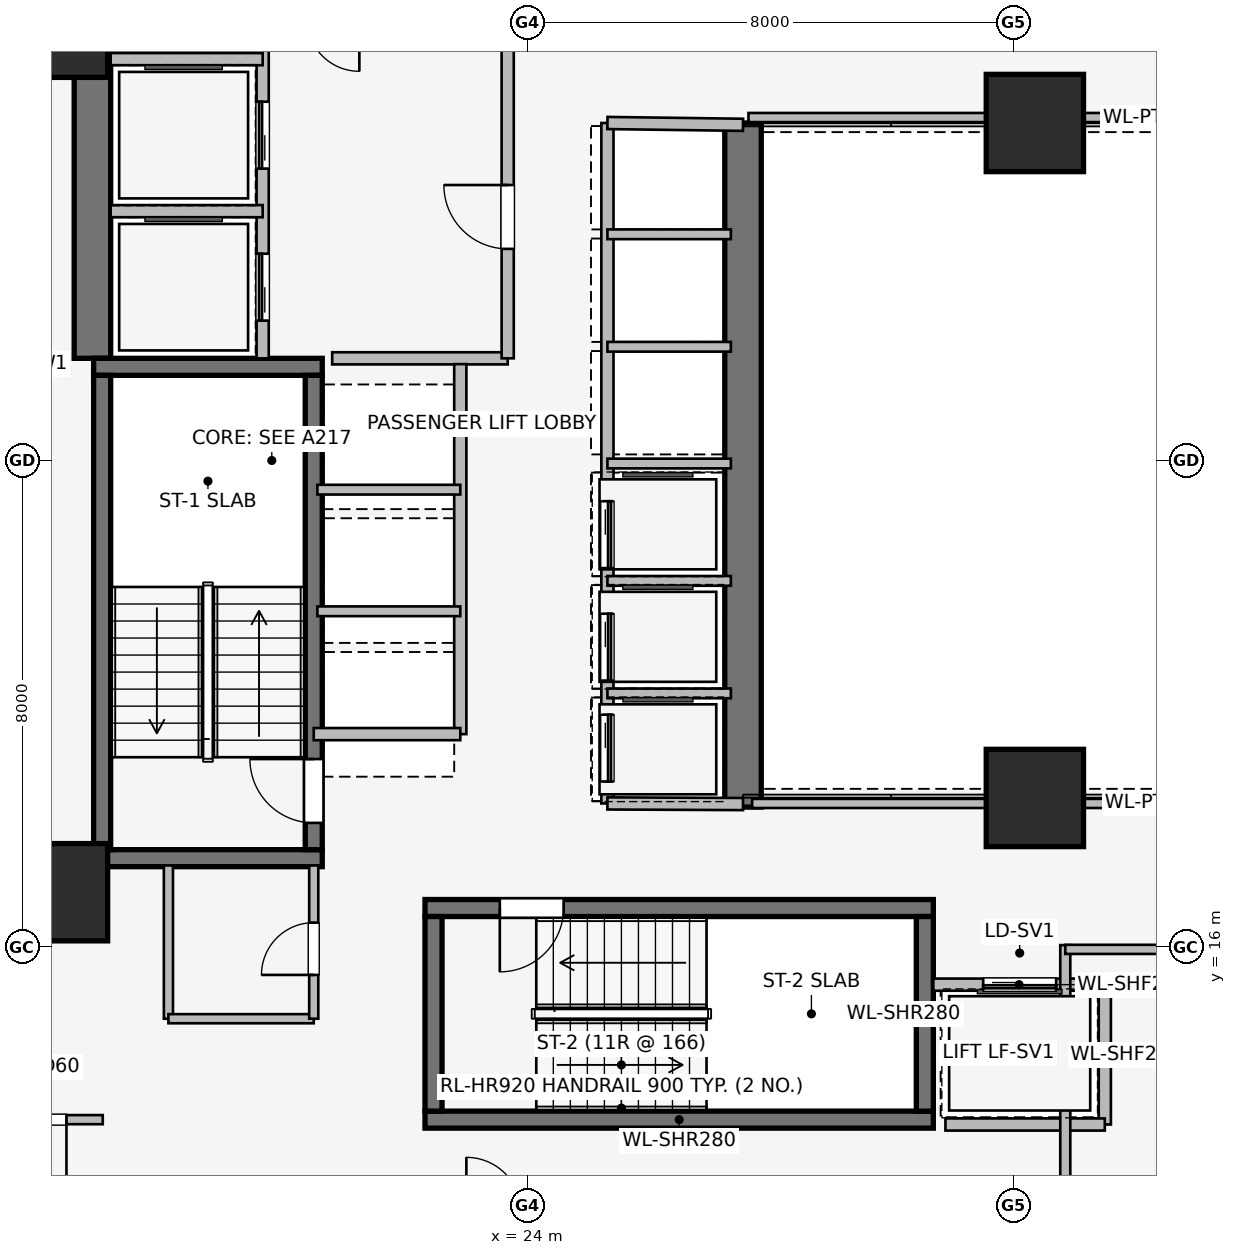
"""IFC4 building model, lengths in metres.
Left out: names, types, materials, properties, quantities, classifications, styles, units other than length and angle.
Written with IfcOpenShell. Run it as: python <this file> out.ifc"""

import sys

from ifc_helpers import new_model, si_unit, direction, frame, frame_2d, origin, origin_2d, place, context, subcontext, project, spatial, rectangle, extrude, element, fill, save


model = new_model("IFC4")
c1 = context("Model", 3, precision=1e-05, world=origin(), true_north=direction((0.0, 1.0)))
c2 = subcontext(c1, "Body", "Model", "MODEL_VIEW")
j1 = project(units=[si_unit("LENGTHUNIT", "METRE"), si_unit("PLANEANGLEUNIT", "RADIAN")], contexts=[c1])
p1 = place(None, origin())
s1 = spatial("IfcSite", under=j1, at=p1, CompositionType="ELEMENT")
p2 = place(p1, origin())
s2 = spatial("IfcBuilding", under=s1, at=p2, CompositionType="ELEMENT")
p3 = place(p2, frame((0.0, 0.0, 59.85)))
s3 = spatial("IfcBuildingStorey", under=s2, at=p3, CompositionType="ELEMENT", Elevation=59.85)
p4 = place(p3, frame((16.85, 25.68, 0.0), z_axis=(0.0, 0.0, 1.0), x_axis=(0.0, 1.0, 0.0)))
e1 = element("IfcWall", 1, at=p4, inside=s3, PredefinedType="SHEAR", context=c2, shape_type="SweptSolid", body=[
    extrude(rectangle(XDim=5.62, YDim=0.6, at=frame_2d((2.81, 0.0))), origin(), (0.0, 0.0, 1.0), 3.65),
])
p5 = place(p3, frame((27.55, 29.55, 0.0), z_axis=(0.0, 0.0, 1.0), x_axis=(0.0, -1.0, 0.0)))
e2 = element("IfcWall", 2, at=p5, inside=s3, PredefinedType="SHEAR", context=c2, shape_type="SweptSolid", body=[
    extrude(rectangle(XDim=11.25, YDim=0.6, at=frame_2d((5.625, 0.0))), origin(), (0.0, 0.0, 1.0), 3.65),
])
for number, where, z_axis, x_axis in (
    (3, (16.87, 17.46, 0.0), (0.0, 0.0, 1.0), (1.0, 0.0, 0.0)),
    (4, (20.63, 25.54, 0.0), (0.0, 0.0, 1.0), (-1.0, 0.0, 0.0)),
):
    element("IfcWall", number, at=place(p3, frame(where, z_axis=z_axis, x_axis=x_axis)), inside=s3, PredefinedType="SHEAR", context=c2, shape_type="SweptSolid", body=[
        extrude(rectangle(XDim=3.76, YDim=0.28, at=frame_2d((1.88, 0.0))), origin(), (0.0, 0.0, 1.0), 3.65),
    ])
p6 = place(p3, frame((17.01, 25.4, 0.0), z_axis=(0.0, 0.0, 1.0), x_axis=(0.0, -1.0, 0.0)))
e5 = element("IfcWall", 5, at=p6, inside=s3, PredefinedType="SHEAR", context=c2, shape_type="SweptSolid", body=[
    extrude(rectangle(XDim=7.8, YDim=0.28, at=frame_2d((3.9, 0.0))), origin(), (0.0, 0.0, 1.0), 3.65),
])
p7 = place(p3, frame((20.49, 17.6, 0.0), z_axis=(0.0, 0.0, 1.0), x_axis=(0.0, 1.0, 0.0)))
e6 = element("IfcWall", 6, at=p7, inside=s3, PredefinedType="SHEAR", context=c2, shape_type="SweptSolid", body=[
    extrude(rectangle(XDim=7.8, YDim=0.28, at=frame_2d((3.9, 0.0))), origin(), (0.0, 0.0, 1.0), 3.65),
])
p8 = place(p7, frame((0.44, 0.0, 0.0)))
e7 = element("IfcOpeningElement", 7, at=p8, cuts=e6, PredefinedType="OPENING", context=c2, shape_type="SweptSolid", body=[
    extrude(rectangle(XDim=1.05, YDim=2.0, at=frame_2d((0.525, 1.0))), frame((0.0, 0.15, 0.0), z_axis=(0.0, -1.0, 0.0), x_axis=(1.0, 0.0, 0.0)), (0.0, 0.0, 1.0), 0.3),
])
p9 = place(p3, frame((22.32, 13.16, 0.0), z_axis=(0.0, 0.0, 1.0), x_axis=(1.0, 0.0, 0.0)))
e8 = element("IfcWall", 8, at=p9, inside=s3, PredefinedType="SHEAR", context=c2, shape_type="SweptSolid", body=[
    extrude(rectangle(XDim=8.36, YDim=0.28, at=frame_2d((4.18, 0.0))), origin(), (0.0, 0.0, 1.0), 3.65),
])
p10 = place(p3, frame((30.68, 16.64, 0.0), z_axis=(0.0, 0.0, 1.0), x_axis=(-1.0, 0.0, 0.0)))
e9 = element("IfcWall", 9, at=p10, inside=s3, PredefinedType="SHEAR", context=c2, shape_type="SweptSolid", body=[
    extrude(rectangle(XDim=8.36, YDim=0.28, at=frame_2d((4.18, 0.0))), origin(), (0.0, 0.0, 1.0), 3.65),
])
p11 = place(p10, frame((6.08, 0.0, 0.0)))
e10 = element("IfcOpeningElement", 10, at=p11, cuts=e9, PredefinedType="OPENING", context=c2, shape_type="SweptSolid", body=[
    extrude(rectangle(XDim=1.05, YDim=2.0, at=frame_2d((0.525, 1.0))), frame((0.0, 0.15, 0.0), z_axis=(0.0, -1.0, 0.0), x_axis=(1.0, 0.0, 0.0)), (0.0, 0.0, 1.0), 0.3),
])
for number, where, z_axis, x_axis in (
    (11, (22.46, 16.5, 0.0), (0.0, 0.0, 1.0), (0.0, -1.0, 0.0)),
    (12, (30.54, 13.3, 0.0), (0.0, 0.0, 1.0), (0.0, 1.0, 0.0)),
):
    element("IfcWall", number, at=place(p3, frame(where, z_axis=z_axis, x_axis=x_axis)), inside=s3, PredefinedType="SHEAR", context=c2, shape_type="SweptSolid", body=[
        extrude(rectangle(XDim=3.2, YDim=0.28, at=frame_2d((1.6, 0.0))), origin(), (0.0, 0.0, 1.0), 3.65),
    ])
for number, where, z_axis, x_axis in (
    (13, (16.3, 16.9, 0.0), (0.0, 0.0, 1.0), (1.0, 0.0, 0.0)),
    (14, (16.3, 31.1, 0.0), (0.0, 0.0, 1.0), (1.0, 0.0, 0.0)),
    (15, (32.35, 18.45, 0.0), (0.0, 0.0, 1.0), (1.0, 0.0, 0.0)),
    (16, (32.35, 29.55, 0.0), (0.0, 0.0, 1.0), (1.0, 0.0, 0.0)),
):
    element("IfcColumn", number, at=place(p3, frame(where, z_axis=z_axis, x_axis=x_axis)), inside=s3, PredefinedType="COLUMN", context=c2, shape_type="SweptSolid", body=[
        extrude(rectangle(XDim=1.6, YDim=1.6, at=origin_2d()), origin(), (0.0, 0.0, 1.0), 3.65),
    ])
p12 = place(p3, frame((16.998, 11.099, 0.0), z_axis=(0.0, 0.0, 1.0), x_axis=(-0.790691856293, 0.61221433207, 0.0)))
e17 = element("IfcWall", 17, at=p12, inside=s3, PredefinedType="STANDARD", context=c2, shape_type="SweptSolid", body=[
    extrude(rectangle(XDim=1.676, YDim=0.33, at=frame_2d((0.838, 0.0))), origin(), (0.0, 0.0, 1.0), 3.39),
])
p13 = place(p3, frame((19.65, 25.68, 0.0), z_axis=(0.0, 0.0, 1.0), x_axis=(0.0, 1.0, 0.0)))
e18 = element("IfcWall", 18, at=p13, inside=s3, PredefinedType="PARTITIONING", context=c2, shape_type="SweptSolid", body=[
    extrude(rectangle(XDim=5.54, YDim=0.2, at=frame_2d((2.77, 0.0))), origin(), (0.0, 0.0, 1.0), 3.39),
])
p14 = place(p13, frame((0.62, 0.0, 0.0)))
e19 = element("IfcOpeningElement", 19, at=p14, cuts=e18, PredefinedType="OPENING", context=c2, shape_type="SweptSolid", body=[
    extrude(rectangle(XDim=1.1, YDim=2.2, at=frame_2d((0.55, 1.1))), frame((0.0, 0.11, 0.0), z_axis=(0.0, -1.0, 0.0), x_axis=(1.0, 0.0, 0.0)), (0.0, 0.0, 1.0), 0.22),
])
p15 = place(p13, frame((3.12, 0.0, 0.0)))
e20 = element("IfcOpeningElement", 20, at=p15, cuts=e18, PredefinedType="OPENING", context=c2, shape_type="SweptSolid", body=[
    extrude(rectangle(XDim=1.1, YDim=2.2, at=frame_2d((0.55, 1.1))), frame((0.0, 0.11, 0.0), z_axis=(0.0, -1.0, 0.0), x_axis=(1.0, 0.0, 0.0)), (0.0, 0.0, 1.0), 0.22),
])
p16 = place(p3, frame((20.793, 25.68, 0.0), z_axis=(0.0, 0.0, 1.0), x_axis=(1.0, 0.0, 0.0)))
e21 = element("IfcWall", 21, at=p16, inside=s3, PredefinedType="PARTITIONING", context=c2, shape_type="SweptSolid", body=[
    extrude(rectangle(XDim=2.887, YDim=0.2, at=frame_2d((1.443, 0.0))), origin(), (0.0, 0.0, 1.0), 3.39),
])
p17 = place(p3, frame((23.68, 25.68, 0.0), z_axis=(0.0, 0.0, 1.0), x_axis=(0.0, 1.0, 0.0)))
e22 = element("IfcWall", 22, at=p17, inside=s3, PredefinedType="PARTITIONING", context=c2, shape_type="SweptSolid", body=[
    extrude(rectangle(XDim=5.54, YDim=0.2, at=frame_2d((2.77, 0.0))), origin(), (0.0, 0.0, 1.0), 3.39),
])
p18 = place(p17, frame((1.8, 0.0, 0.0)))
e23 = element("IfcOpeningElement", 23, at=p18, cuts=e22, PredefinedType="OPENING", context=c2, shape_type="SweptSolid", body=[
    extrude(rectangle(XDim=1.05, YDim=2.0, at=frame_2d((0.525, 1.0))), frame((0.0, 0.11, 0.0), z_axis=(0.0, -1.0, 0.0), x_axis=(1.0, 0.0, 0.0)), (0.0, 0.0, 1.0), 0.22),
])
p19 = place(p3, frame((17.15, 28.1, 0.0), z_axis=(0.0, 0.0, 1.0), x_axis=(1.0, 0.0, 0.0)))
e24 = element("IfcWall", 24, at=p19, inside=s3, PredefinedType="PARTITIONING", context=c2, shape_type="SweptSolid", body=[
    extrude(rectangle(XDim=2.5, YDim=0.2, at=frame_2d((1.25, 0.0))), origin(), (0.0, 0.0, 1.0), 3.39),
])
p20 = place(p3, frame((19.65, 30.6, 0.0), z_axis=(0.0, 0.0, 1.0), x_axis=(-1.0, 0.0, 0.0)))
e25 = element("IfcWall", 25, at=p20, inside=s3, PredefinedType="PARTITIONING", context=c2, shape_type="SweptSolid", body=[
    extrude(rectangle(XDim=2.5, YDim=0.2, at=frame_2d((1.25, 0.0))), origin(), (0.0, 0.0, 1.0), 2.29),
])
p21 = place(p3, frame((33.5, 15.38, 0.0), z_axis=(0.0, 0.0, 1.0), x_axis=(-1.0, 0.0, 0.0)))
e26 = element("IfcWall", 26, at=p21, inside=s3, PredefinedType="PARTITIONING", context=c2, shape_type="SweptSolid", body=[
    extrude(rectangle(XDim=2.82, YDim=0.2, at=frame_2d((1.41, 0.0))), origin(), (0.0, 0.0, 1.0), 3.39),
])
p22 = place(p21, frame((0.8, 0.0, 0.0)))
e27 = element("IfcOpeningElement", 27, at=p22, cuts=e26, PredefinedType="OPENING", context=c2, shape_type="SweptSolid", body=[
    extrude(rectangle(XDim=1.2, YDim=2.2, at=frame_2d((0.6, 1.1))), frame((0.0, 0.11, 0.0), z_axis=(0.0, -1.0, 0.0), x_axis=(1.0, 0.0, 0.0)), (0.0, 0.0, 1.0), 0.22),
])
p23 = place(p3, frame((33.5, 13.08, 0.0), z_axis=(0.0, 0.0, 1.0), x_axis=(0.0, 1.0, 0.0)))
e28 = element("IfcWall", 28, at=p23, inside=s3, PredefinedType="PARTITIONING", context=c2, shape_type="SweptSolid", body=[
    extrude(rectangle(XDim=2.3, YDim=0.2, at=frame_2d((1.15, 0.0))), origin(), (0.0, 0.0, 1.0), 3.39),
])
p24 = place(p3, frame((30.879, 13.08, 0.0), z_axis=(0.0, 0.0, 1.0), x_axis=(1.0, 0.0, 0.0)))
e29 = element("IfcWall", 29, at=p24, inside=s3, PredefinedType="PARTITIONING", context=c2, shape_type="SweptSolid", body=[
    extrude(rectangle(XDim=2.621, YDim=0.2, at=frame_2d((1.311, 0.0))), origin(), (0.0, 0.0, 1.0), 3.39),
])
p25 = place(p3, frame((22.9, 19.5, 0.0), z_axis=(0.0, 0.0, 1.0), x_axis=(0.0, 1.0, 0.0)))
e30 = element("IfcWall", 30, at=p25, inside=s3, PredefinedType="PARTITIONING", context=c2, shape_type="SweptSolid", body=[
    extrude(rectangle(XDim=6.085, YDim=0.2, at=frame_2d((3.042, 0.0))), origin(), (0.0, 0.0, 1.0), 3.39),
])
p26 = place(p3, frame((20.49, 19.5, 0.0), z_axis=(0.0, 0.0, 1.0), x_axis=(1.0, 0.0, 0.0)))
e31 = element("IfcWall", 31, at=p26, inside=s3, PredefinedType="PARTITIONING", context=c2, shape_type="SweptSolid", body=[
    extrude(rectangle(XDim=2.41, YDim=0.2, at=frame_2d((1.205, 0.0))), origin(), (0.0, 0.0, 1.0), 2.29),
])
for number, where, z_axis, x_axis in (
    (32, (20.55, 21.52, 0.0), (0.0, 0.0, 1.0), (1.0, 0.0, 0.0)),
    (33, (20.55, 23.52, 0.0), (0.0, 0.0, 1.0), (1.0, 0.0, 0.0)),
):
    element("IfcWall", number, at=place(p3, frame(where, z_axis=z_axis, x_axis=x_axis)), inside=s3, PredefinedType="PARTITIONING", context=c2, shape_type="SweptSolid", body=[
        extrude(rectangle(XDim=2.35, YDim=0.16, at=frame_2d((1.175, 0.0))), origin(), (0.0, 0.0, 1.0), 3.39),
    ])
p27 = place(p3, frame((25.32, 29.55, 0.0), z_axis=(0.0, 0.0, 1.0), x_axis=(0.0, -1.0, 0.0)))
e34 = element("IfcWall", 34, at=p27, inside=s3, PredefinedType="PARTITIONING", context=c2, shape_type="SweptSolid", body=[
    extrude(rectangle(XDim=11.19, YDim=0.2, at=frame_2d((5.595, 0.0))), origin(), (0.0, 0.0, 1.0), 3.39),
])
p28 = place(p27, frame((6.22, 0.0, 0.0)))
e35 = element("IfcOpeningElement", 35, at=p28, cuts=e34, PredefinedType="OPENING", context=c2, shape_type="SweptSolid", body=[
    extrude(rectangle(XDim=1.1, YDim=2.2, at=frame_2d((0.55, 1.1))), frame((0.0, 0.11, 0.0), z_axis=(0.0, -1.0, 0.0), x_axis=(1.0, 0.0, 0.0)), (0.0, 0.0, 1.0), 0.22),
])
p29 = place(p27, frame((8.07, 0.0, 0.0)))
e36 = element("IfcOpeningElement", 36, at=p29, cuts=e34, PredefinedType="OPENING", context=c2, shape_type="SweptSolid", body=[
    extrude(rectangle(XDim=1.1, YDim=2.2, at=frame_2d((0.55, 1.1))), frame((0.0, 0.11, 0.0), z_axis=(0.0, -1.0, 0.0), x_axis=(1.0, 0.0, 0.0)), (0.0, 0.0, 1.0), 0.22),
])
p30 = place(p27, frame((9.73, 0.0, 0.0)))
e37 = element("IfcOpeningElement", 37, at=p30, cuts=e34, PredefinedType="OPENING", context=c2, shape_type="SweptSolid", body=[
    extrude(rectangle(XDim=1.1, YDim=2.2, at=frame_2d((0.55, 1.1))), frame((0.0, 0.11, 0.0), z_axis=(0.0, -1.0, 0.0), x_axis=(1.0, 0.0, 0.0)), (0.0, 0.0, 1.0), 0.22),
])
p31 = place(p3, frame((25.32, 18.36, 0.0), z_axis=(0.0, 0.0, 1.0), x_axis=(0.999989925833, -0.004488678231, 0.0)))
e38 = element("IfcWall", 38, at=p31, inside=s3, PredefinedType="PARTITIONING", context=c2, shape_type="SweptSolid", body=[
    extrude(rectangle(XDim=2.23, YDim=0.2, at=frame_2d((1.115, 0.0))), origin(), (0.0, 0.0, 1.0), 3.39),
])
p32 = place(p3, frame((27.55, 29.52, 0.0), z_axis=(0.0, 0.0, 1.0), x_axis=(-0.999909343457, 0.013464949556, 0.0)))
e39 = element("IfcWall", 39, at=p32, inside=s3, PredefinedType="PARTITIONING", context=c2, shape_type="SweptSolid", body=[
    extrude(rectangle(XDim=2.23, YDim=0.2, at=frame_2d((1.115, 0.0))), origin(), (0.0, 0.0, 1.0), 2.29),
])
for number, where, z_axis, x_axis in (
    (40, (25.32, 20.17, 0.0), (0.0, 0.0, 1.0), (1.0, 0.0, 0.0)),
    (41, (25.32, 22.02, 0.0), (0.0, 0.0, 1.0), (1.0, 0.0, 0.0)),
    (42, (25.32, 23.95, 0.0), (0.0, 0.0, 1.0), (1.0, 0.0, 0.0)),
    (43, (25.32, 25.87, 0.0), (0.0, 0.0, 1.0), (1.0, 0.0, 0.0)),
    (44, (25.32, 27.72, 0.0), (0.0, 0.0, 1.0), (1.0, 0.0, 0.0)),
):
    element("IfcWall", number, at=place(p3, frame(where, z_axis=z_axis, x_axis=x_axis)), inside=s3, PredefinedType="PARTITIONING", context=c2, shape_type="SweptSolid", body=[
        extrude(rectangle(XDim=2.03, YDim=0.16, at=frame_2d((1.015, 0.0))), origin(), (0.0, 0.0, 1.0), 3.39),
    ])
p33 = place(p3, frame((18.1, 17.34, 0.0), z_axis=(0.0, 0.0, 1.0), x_axis=(0.0, -1.0, 0.0)))
e45 = element("IfcWall", 45, at=p33, inside=s3, PredefinedType="PARTITIONING", context=c2, shape_type="SweptSolid", body=[
    extrude(rectangle(XDim=2.52, YDim=0.15, at=frame_2d((1.26, 0.0))), origin(), (0.0, 0.0, 1.0), 3.39),
])
p34 = place(p3, frame((18.1, 14.82, 0.0), z_axis=(0.0, 0.0, 1.0), x_axis=(1.0, 0.0, 0.0)))
e46 = element("IfcWall", 46, at=p34, inside=s3, PredefinedType="PARTITIONING", context=c2, shape_type="SweptSolid", body=[
    extrude(rectangle(XDim=2.39, YDim=0.15, at=frame_2d((1.195, 0.0))), origin(), (0.0, 0.0, 1.0), 3.39),
])
p35 = place(p3, frame((20.49, 14.82, 0.0), z_axis=(0.0, 0.0, 1.0), x_axis=(0.0, 1.0, 0.0)))
e47 = element("IfcWall", 47, at=p35, inside=s3, PredefinedType="PARTITIONING", context=c2, shape_type="SweptSolid", body=[
    extrude(rectangle(XDim=2.52, YDim=0.15, at=frame_2d((1.26, 0.0))), origin(), (0.0, 0.0, 1.0), 3.39),
])
p36 = place(p35, frame((0.72, 0.0, 0.0)))
e48 = element("IfcOpeningElement", 48, at=p36, cuts=e47, PredefinedType="OPENING", context=c2, shape_type="SweptSolid", body=[
    extrude(rectangle(XDim=0.86, YDim=2.0, at=frame_2d((0.43, 1.0))), frame((0.0, 0.085, 0.0), z_axis=(0.0, -1.0, 0.0), x_axis=(1.0, 0.0, 0.0)), (0.0, 0.0, 1.0), 0.17),
])
p37 = place(p3, frame((27.7, 18.36, 0.0), z_axis=(0.0, 0.0, 1.0), x_axis=(1.0, 0.0, 0.0)))
e49 = element("IfcWall", 49, at=p37, inside=s3, PredefinedType="PARTITIONING", context=c2, shape_type="SweptSolid", body=[
    extrude(rectangle(XDim=12.14, YDim=0.15, at=frame_2d((6.07, 0.0))), origin(), (0.0, 0.0, 1.0), 2.531),
])
p38 = place(p3, frame((39.84, 29.64, 0.0), z_axis=(0.0, 0.0, 1.0), x_axis=(-1.0, 0.0, 0.0)))
e50 = element("IfcWall", 50, at=p38, inside=s3, PredefinedType="PARTITIONING", context=c2, shape_type="SweptSolid", body=[
    extrude(rectangle(XDim=12.2, YDim=0.15, at=frame_2d((6.1, 0.0))), origin(), (0.0, 0.0, 1.0), 2.531),
])
p39 = place(p3, frame((32.85, 3.064, 0.0), z_axis=(0.0, 0.0, 1.0), x_axis=(0.0, 1.0, 0.0)))
e51 = element("IfcWall", 51, at=p39, inside=s3, PredefinedType="PARTITIONING", context=c2, shape_type="SweptSolid", body=[
    extrude(rectangle(XDim=12.966, YDim=0.165, at=frame_2d((6.483, 0.0))), origin(), (0.0, 0.0, 1.0), 3.39),
])
p40 = place(p3, frame((17.02, 13.16, 0.0), z_axis=(0.0, 0.0, 1.0), x_axis=(-1.0, 0.0, 0.0)))
e52 = element("IfcWall", 52, at=p40, inside=s3, PredefinedType="PARTITIONING", context=c2, shape_type="SweptSolid", body=[
    extrude(rectangle(XDim=2.12, YDim=0.15, at=frame_2d((1.06, 0.0))), origin(), (0.0, 0.0, 1.0), 3.39),
])
p41 = place(p40, frame((0.597, 0.0, 0.0)))
e53 = element("IfcOpeningElement", 53, at=p41, cuts=e52, PredefinedType="OPENING", context=c2, shape_type="SweptSolid", body=[
    extrude(rectangle(XDim=0.96, YDim=2.0, at=frame_2d((0.48, 1.0))), frame((0.0, 0.085, 0.0), z_axis=(0.0, -1.0, 0.0), x_axis=(1.0, 0.0, 0.0)), (0.0, 0.0, 1.0), 0.17),
])
p42 = place(p3, frame((32.85, 15.96, 0.0), z_axis=(0.0, 0.0, 1.0), x_axis=(1.0, 0.0, 0.0)))
e54 = element("IfcWall", 54, at=p42, inside=s3, PredefinedType="PARTITIONING", context=c2, shape_type="SweptSolid", body=[
    extrude(rectangle(XDim=27.403, YDim=0.15, at=frame_2d((13.701, 0.0))), origin(), (0.0, 0.0, 1.0), 3.39),
])
p43 = place(p42, frame((13.235, 0.0, 0.0)))
e55 = element("IfcOpeningElement", 55, at=p43, cuts=e54, PredefinedType="OPENING", context=c2, shape_type="SweptSolid", body=[
    extrude(rectangle(XDim=0.96, YDim=2.0, at=frame_2d((0.48, 1.0))), frame((0.0, 0.085, 0.0), z_axis=(0.0, -1.0, 0.0), x_axis=(1.0, 0.0, 0.0)), (0.0, 0.0, 1.0), 0.17),
])
p44 = place(p8, origin())
e56 = element("IfcDoor", 56, at=p44, inside=s3, OperationType="SINGLE_SWING_RIGHT", PredefinedType="DOOR", context=c2, shape_type="SweptSolid", body=[
    extrude(rectangle(XDim=1.05, YDim=2.0, at=frame_2d((0.525, 1.0))), frame((0.0, 0.025, 0.0), z_axis=(0.0, -1.0, 0.0), x_axis=(1.0, 0.0, 0.0)), (0.0, 0.0, 1.0), 0.05),
])
fill(e7, e56)
p45 = place(p11, origin())
e57 = element("IfcDoor", 57, at=p45, inside=s3, OperationType="SINGLE_SWING_RIGHT", PredefinedType="DOOR", context=c2, shape_type="SweptSolid", body=[
    extrude(rectangle(XDim=1.05, YDim=2.0, at=frame_2d((0.525, 1.0))), frame((0.0, 0.025, 0.0), z_axis=(0.0, -1.0, 0.0), x_axis=(1.0, 0.0, 0.0)), (0.0, 0.0, 1.0), 0.05),
])
fill(e10, e57)
p46 = place(p14, origin())
e58 = element("IfcDoor", 58, at=p46, inside=s3, OperationType="SLIDING_TO_LEFT", PredefinedType="DOOR", context=c2, shape_type="SweptSolid", body=[
    extrude(rectangle(XDim=1.1, YDim=2.2, at=frame_2d((0.55, 1.1))), frame((0.0, 0.025, 0.0), z_axis=(0.0, -1.0, 0.0), x_axis=(1.0, 0.0, 0.0)), (0.0, 0.0, 1.0), 0.05),
])
fill(e19, e58)
p47 = place(p15, origin())
e59 = element("IfcDoor", 59, at=p47, inside=s3, OperationType="SLIDING_TO_LEFT", PredefinedType="DOOR", context=c2, shape_type="SweptSolid", body=[
    extrude(rectangle(XDim=1.1, YDim=2.2, at=frame_2d((0.55, 1.1))), frame((0.0, 0.025, 0.0), z_axis=(0.0, -1.0, 0.0), x_axis=(1.0, 0.0, 0.0)), (0.0, 0.0, 1.0), 0.05),
])
fill(e20, e59)
p48 = place(p18, origin())
e60 = element("IfcDoor", 60, at=p48, inside=s3, OperationType="SINGLE_SWING_RIGHT", PredefinedType="DOOR", context=c2, shape_type="SweptSolid", body=[
    extrude(rectangle(XDim=1.05, YDim=2.0, at=frame_2d((0.525, 1.0))), frame((0.0, 0.025, 0.0), z_axis=(0.0, -1.0, 0.0), x_axis=(1.0, 0.0, 0.0)), (0.0, 0.0, 1.0), 0.05),
])
fill(e23, e60)
p49 = place(p22, origin())
e61 = element("IfcDoor", 61, at=p49, inside=s3, OperationType="SLIDING_TO_RIGHT", PredefinedType="DOOR", context=c2, shape_type="SweptSolid", body=[
    extrude(rectangle(XDim=1.2, YDim=2.2, at=frame_2d((0.6, 1.1))), frame((0.0, 0.025, 0.0), z_axis=(0.0, -1.0, 0.0), x_axis=(1.0, 0.0, 0.0)), (0.0, 0.0, 1.0), 0.05),
])
fill(e27, e61)
p50 = place(p28, origin())
e62 = element("IfcDoor", 62, at=p50, inside=s3, OperationType="SLIDING_TO_LEFT", PredefinedType="DOOR", context=c2, shape_type="SweptSolid", body=[
    extrude(rectangle(XDim=1.1, YDim=2.2, at=frame_2d((0.55, 1.1))), frame((0.0, 0.025, 0.0), z_axis=(0.0, -1.0, 0.0), x_axis=(1.0, 0.0, 0.0)), (0.0, 0.0, 1.0), 0.05),
])
fill(e35, e62)
p51 = place(p29, origin())
e63 = element("IfcDoor", 63, at=p51, inside=s3, OperationType="SLIDING_TO_LEFT", PredefinedType="DOOR", context=c2, shape_type="SweptSolid", body=[
    extrude(rectangle(XDim=1.1, YDim=2.2, at=frame_2d((0.55, 1.1))), frame((0.0, 0.025, 0.0), z_axis=(0.0, -1.0, 0.0), x_axis=(1.0, 0.0, 0.0)), (0.0, 0.0, 1.0), 0.05),
])
fill(e36, e63)
p52 = place(p30, origin())
e64 = element("IfcDoor", 64, at=p52, inside=s3, OperationType="SLIDING_TO_LEFT", PredefinedType="DOOR", context=c2, shape_type="SweptSolid", body=[
    extrude(rectangle(XDim=1.1, YDim=2.2, at=frame_2d((0.55, 1.1))), frame((0.0, 0.025, 0.0), z_axis=(0.0, -1.0, 0.0), x_axis=(1.0, 0.0, 0.0)), (0.0, 0.0, 1.0), 0.05),
])
fill(e37, e64)
p53 = place(p36, origin())
e65 = element("IfcDoor", 65, at=p53, inside=s3, OperationType="SINGLE_SWING_LEFT", PredefinedType="DOOR", context=c2, shape_type="SweptSolid", body=[
    extrude(rectangle(XDim=0.86, YDim=2.0, at=frame_2d((0.43, 1.0))), frame((0.0, 0.025, 0.0), z_axis=(0.0, -1.0, 0.0), x_axis=(1.0, 0.0, 0.0)), (0.0, 0.0, 1.0), 0.05),
])
fill(e48, e65)
p54 = place(p41, origin())
e66 = element("IfcDoor", 66, at=p54, inside=s3, OperationType="SINGLE_SWING_LEFT", PredefinedType="DOOR", context=c2, shape_type="SweptSolid", body=[
    extrude(rectangle(XDim=0.96, YDim=2.0, at=frame_2d((0.48, 1.0))), frame((0.0, 0.025, 0.0), z_axis=(0.0, -1.0, 0.0), x_axis=(1.0, 0.0, 0.0)), (0.0, 0.0, 1.0), 0.05),
])
fill(e53, e66)
save(model, sys.argv[1])
